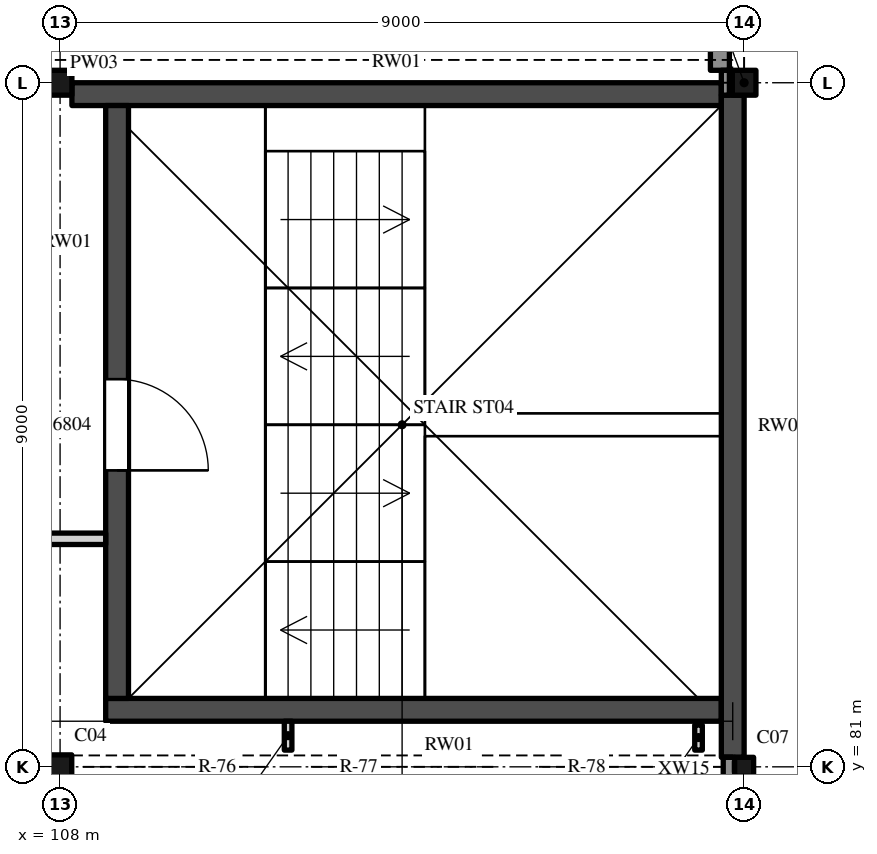
"""IFC4 building model, lengths in metres.
Left out: names, types, materials, properties, quantities, classifications, styles, units other than length and angle.
Written with IfcOpenShell. Run it as: python <this file> out.ifc"""

import sys

from ifc_helpers import new_model, si_unit, direction, frame, frame_2d, origin, origin_2d, place, context, subcontext, project, spatial, polyline, rectangle, hollow_rectangle, i_section, outline, extrude, element, fill, save


model = new_model("IFC4")
c1 = context("Model", 3, precision=1e-05, world=origin(), true_north=direction((0.0, 1.0)))
c2 = subcontext(c1, "Body", "Model", "MODEL_VIEW")
j1 = project(units=[si_unit("LENGTHUNIT", "METRE"), si_unit("PLANEANGLEUNIT", "RADIAN")], contexts=[c1])
p1 = place(None, origin())
s1 = spatial("IfcSite", under=j1, at=p1, CompositionType="ELEMENT")
p2 = place(p1, origin())
s2 = spatial("IfcBuilding", under=s1, at=p2, CompositionType="ELEMENT")
p3 = place(p2, frame((0.0, 0.0, 36.0)))
s3 = spatial("IfcBuildingStorey", under=s2, at=p3, CompositionType="ELEMENT", Elevation=36.0)
p4 = place(p3, frame((108.0, 81.0, 0.0), z_axis=(0.0, 0.0, 1.0), x_axis=(1.0, 0.0, 0.0)))
e1 = element("IfcColumn", 1, at=p4, inside=s3, PredefinedType="COLUMN", context=c2, shape_type="SweptSolid", body=[
    extrude(i_section(OverallWidth=0.307, OverallDepth=0.315, WebThickness=0.012, FlangeThickness=0.019, FilletRadius=0.017, at=origin_2d()), origin(), (0.0, 0.0, 1.0), 8.0),
])
p5 = place(p3, frame((117.0, 81.0, 0.0), z_axis=(0.0, 0.0, 1.0), x_axis=(1.0, 0.0, 0.0)))
e2 = element("IfcColumn", 2, at=p5, inside=s3, PredefinedType="COLUMN", context=c2, shape_type="SweptSolid", body=[
    extrude(hollow_rectangle(XDim=0.25, YDim=0.25, WallThickness=0.009, InnerFilletRadius=0.013, OuterFilletRadius=0.022, at=origin_2d()), origin(), (0.0, 0.0, 1.0), 8.0),
])
for number, where, z_axis, x_axis in (
    (3, (108.0, 90.0, 0.0), (0.0, 0.0, 1.0), (1.0, 0.0, 0.0)),
    (4, (117.0, 90.0, 0.0), (0.0, 0.0, 1.0), (1.0, 0.0, 0.0)),
):
    element("IfcColumn", number, at=place(p3, frame(where, z_axis=z_axis, x_axis=x_axis)), inside=s3, PredefinedType="COLUMN", context=c2, shape_type="SweptSolid", body=[
        extrude(i_section(OverallWidth=0.311, OverallDepth=0.327, WebThickness=0.016, FlangeThickness=0.025, FilletRadius=0.017, at=origin_2d()), origin(), (0.0, 0.0, 1.0), 7.785),
    ])
p6 = place(p3, frame((108.6, 81.75, 0.0), z_axis=(0.0, 0.0, 1.0), x_axis=(1.0, 0.0, 0.0)))
e5 = element("IfcWall", 5, at=p6, inside=s3, PredefinedType="SHEAR", context=c2, shape_type="SweptSolid", body=[
    extrude(rectangle(XDim=8.1, YDim=0.3, at=frame_2d((4.05, 0.0))), origin(), (0.0, 0.0, 1.0), 14.344),
])
p7 = place(p3, frame((108.156, 89.85, 0.0), z_axis=(0.0, 0.0, 1.0), x_axis=(1.0, 0.0, 0.0)))
e6 = element("IfcWall", 6, at=p7, inside=s3, PredefinedType="SHEAR", context=c2, shape_type="SweptSolid", body=[
    extrude(rectangle(XDim=8.544, YDim=0.3, at=frame_2d((4.272, 0.0))), origin(), (0.0, 0.0, 1.0), 7.864),
])
p8 = place(p3, frame((108.75, 81.9, 0.0), z_axis=(0.0, 0.0, 1.0), x_axis=(0.0, 1.0, 0.0)))
e7 = element("IfcWall", 7, at=p8, inside=s3, PredefinedType="SHEAR", context=c2, shape_type="SweptSolid", body=[
    extrude(outline(polyline([(0.0, 0.0), (7.8, 0.0), (7.8, 7.984), (0.0, 14.224), (0.0, 0.0)])), frame((0.0, 0.15, 0.0), z_axis=(0.0, -1.0, 0.0), x_axis=(1.0, 0.0, 0.0)), (0.0, 0.0, 1.0), 0.3),
])
p9 = place(p8, frame((3.0, 0.0, 0.0)))
e8 = element("IfcOpeningElement", 8, at=p9, cuts=e7, PredefinedType="OPENING", context=c2, shape_type="SweptSolid", body=[
    extrude(rectangle(XDim=1.2, YDim=2.1, at=frame_2d((0.6, 1.05))), frame((0.0, 0.16, 0.0), z_axis=(0.0, -1.0, 0.0), x_axis=(1.0, 0.0, 0.0)), (0.0, 0.0, 1.0), 0.32),
])
p10 = place(p3, frame((116.85, 81.125, 0.0), z_axis=(0.0, 0.0, 1.0), x_axis=(0.0, 1.0, 0.0)))
e9 = element("IfcWall", 9, at=p10, inside=s3, PredefinedType="SHEAR", context=c2, shape_type="SweptSolid", body=[
    extrude(outline(polyline([(0.0, 0.0), (8.711, 0.0), (8.711, 7.875), (0.0, 14.844), (0.0, 0.0)])), frame((0.0, 0.15, 0.0), z_axis=(0.0, -1.0, 0.0), x_axis=(1.0, 0.0, 0.0)), (0.0, 0.0, 1.0), 0.3),
])
p11 = place(p3, frame((116.681, 90.164, 0.0), z_axis=(0.0, 0.0, 1.0), x_axis=(0.0, 1.0, 0.0)))
e10 = element("IfcWall", 10, at=p11, inside=s3, PredefinedType="SOLIDWALL", context=c2, shape_type="SweptSolid", body=[
    extrude(rectangle(XDim=8.676, YDim=0.25, at=frame_2d((4.338, 0.0))), origin(), (0.0, 0.0, 1.0), 7.8),
])
p12 = place(p11, frame((0.586, 0.0, 1.6)))
e11 = element("IfcOpeningElement", 11, at=p12, cuts=e10, PredefinedType="OPENING", context=c2, shape_type="SweptSolid", body=[
    extrude(rectangle(XDim=1.6, YDim=1.2, at=frame_2d((0.8, 0.6))), frame((0.0, 0.135, 0.0), z_axis=(0.0, -1.0, 0.0), x_axis=(1.0, 0.0, 0.0)), (0.0, 0.0, 1.0), 0.27),
])
p13 = place(p11, frame((3.541, 0.0, 1.6)))
e12 = element("IfcOpeningElement", 12, at=p13, cuts=e10, PredefinedType="OPENING", context=c2, shape_type="SweptSolid", body=[
    extrude(rectangle(XDim=1.6, YDim=1.2, at=frame_2d((0.8, 0.6))), frame((0.0, 0.135, 0.0), z_axis=(0.0, -1.0, 0.0), x_axis=(1.0, 0.0, 0.0)), (0.0, 0.0, 1.0), 0.27),
])
p14 = place(p11, frame((6.486, 0.0, 1.6)))
e13 = element("IfcOpeningElement", 13, at=p14, cuts=e10, PredefinedType="OPENING", context=c2, shape_type="SweptSolid", body=[
    extrude(rectangle(XDim=1.6, YDim=1.2, at=frame_2d((0.8, 0.6))), frame((0.0, 0.135, 0.0), z_axis=(0.0, -1.0, 0.0), x_axis=(1.0, 0.0, 0.0)), (0.0, 0.0, 1.0), 0.27),
])
p15 = place(p3, frame((116.8, 80.803, 0.0), z_axis=(0.0, 0.0, 1.0), x_axis=(0.0, 1.0, 0.0)))
e14 = element("IfcWall", 14, at=p15, inside=s3, PredefinedType="SOLIDWALL", context=c2, shape_type="SweptSolid", body=[
    extrude(rectangle(XDim=0.322, YDim=0.15, at=frame_2d((0.161, 0.0))), origin(), (0.0, 0.0, 1.0), 14.844),
])
p16 = place(p3, frame((116.753, 89.836, 0.0), z_axis=(0.0, 0.0, 1.0), x_axis=(0.0, 1.0, 0.0)))
e15 = element("IfcWall", 15, at=p16, inside=s3, PredefinedType="SOLIDWALL", context=c2, shape_type="SweptSolid", body=[
    extrude(rectangle(XDim=0.327, YDim=0.106, at=frame_2d((0.164, 0.0))), origin(), (0.0, 0.0, 1.0), 14.844),
])
p17 = place(p3, frame((54.15, 81.0, 15.2), z_axis=(0.0, 0.0, 1.0), x_axis=(1.0, 0.0, 0.0)))
e16 = element("IfcWall", 16, at=p17, inside=s3, PredefinedType="SOLIDWALL", context=c2, shape_type="SweptSolid", body=[
    extrude(rectangle(XDim=62.7, YDim=0.3, at=frame_2d((31.35, 0.0))), origin(), (0.0, 0.0, 1.0), 0.9),
])
p18 = place(p17, frame((0.15, 0.0, 0.15)))
e17 = element("IfcOpeningElement", 17, at=p18, cuts=e16, PredefinedType="OPENING", context=c2, shape_type="SweptSolid", body=[
    extrude(rectangle(XDim=2.4, YDim=0.6, at=frame_2d((1.2, 0.3))), frame((0.0, 0.16, 0.0), z_axis=(0.0, -1.0, 0.0), x_axis=(1.0, 0.0, 0.0)), (0.0, 0.0, 1.0), 0.32),
])
p19 = place(p17, frame((3.15, 0.0, 0.15)))
e18 = element("IfcOpeningElement", 18, at=p19, cuts=e16, PredefinedType="OPENING", context=c2, shape_type="SweptSolid", body=[
    extrude(rectangle(XDim=2.4, YDim=0.6, at=frame_2d((1.2, 0.3))), frame((0.0, 0.16, 0.0), z_axis=(0.0, -1.0, 0.0), x_axis=(1.0, 0.0, 0.0)), (0.0, 0.0, 1.0), 0.32),
])
p20 = place(p17, frame((6.15, 0.0, 0.15)))
e19 = element("IfcOpeningElement", 19, at=p20, cuts=e16, PredefinedType="OPENING", context=c2, shape_type="SweptSolid", body=[
    extrude(rectangle(XDim=2.4, YDim=0.6, at=frame_2d((1.2, 0.3))), frame((0.0, 0.16, 0.0), z_axis=(0.0, -1.0, 0.0), x_axis=(1.0, 0.0, 0.0)), (0.0, 0.0, 1.0), 0.32),
])
p21 = place(p17, frame((9.15, 0.0, 0.15)))
e20 = element("IfcOpeningElement", 20, at=p21, cuts=e16, PredefinedType="OPENING", context=c2, shape_type="SweptSolid", body=[
    extrude(rectangle(XDim=2.4, YDim=0.6, at=frame_2d((1.2, 0.3))), frame((0.0, 0.16, 0.0), z_axis=(0.0, -1.0, 0.0), x_axis=(1.0, 0.0, 0.0)), (0.0, 0.0, 1.0), 0.32),
])
p22 = place(p17, frame((12.15, 0.0, 0.15)))
e21 = element("IfcOpeningElement", 21, at=p22, cuts=e16, PredefinedType="OPENING", context=c2, shape_type="SweptSolid", body=[
    extrude(rectangle(XDim=2.4, YDim=0.6, at=frame_2d((1.2, 0.3))), frame((0.0, 0.16, 0.0), z_axis=(0.0, -1.0, 0.0), x_axis=(1.0, 0.0, 0.0)), (0.0, 0.0, 1.0), 0.32),
])
p23 = place(p17, frame((15.15, 0.0, 0.15)))
e22 = element("IfcOpeningElement", 22, at=p23, cuts=e16, PredefinedType="OPENING", context=c2, shape_type="SweptSolid", body=[
    extrude(rectangle(XDim=2.4, YDim=0.6, at=frame_2d((1.2, 0.3))), frame((0.0, 0.16, 0.0), z_axis=(0.0, -1.0, 0.0), x_axis=(1.0, 0.0, 0.0)), (0.0, 0.0, 1.0), 0.32),
])
p24 = place(p17, frame((18.15, 0.0, 0.15)))
e23 = element("IfcOpeningElement", 23, at=p24, cuts=e16, PredefinedType="OPENING", context=c2, shape_type="SweptSolid", body=[
    extrude(rectangle(XDim=2.4, YDim=0.6, at=frame_2d((1.2, 0.3))), frame((0.0, 0.16, 0.0), z_axis=(0.0, -1.0, 0.0), x_axis=(1.0, 0.0, 0.0)), (0.0, 0.0, 1.0), 0.32),
])
p25 = place(p17, frame((21.15, 0.0, 0.15)))
e24 = element("IfcOpeningElement", 24, at=p25, cuts=e16, PredefinedType="OPENING", context=c2, shape_type="SweptSolid", body=[
    extrude(rectangle(XDim=2.4, YDim=0.6, at=frame_2d((1.2, 0.3))), frame((0.0, 0.16, 0.0), z_axis=(0.0, -1.0, 0.0), x_axis=(1.0, 0.0, 0.0)), (0.0, 0.0, 1.0), 0.32),
])
p26 = place(p17, frame((24.15, 0.0, 0.15)))
e25 = element("IfcOpeningElement", 25, at=p26, cuts=e16, PredefinedType="OPENING", context=c2, shape_type="SweptSolid", body=[
    extrude(rectangle(XDim=2.4, YDim=0.6, at=frame_2d((1.2, 0.3))), frame((0.0, 0.16, 0.0), z_axis=(0.0, -1.0, 0.0), x_axis=(1.0, 0.0, 0.0)), (0.0, 0.0, 1.0), 0.32),
])
p27 = place(p17, frame((27.15, 0.0, 0.15)))
e26 = element("IfcOpeningElement", 26, at=p27, cuts=e16, PredefinedType="OPENING", context=c2, shape_type="SweptSolid", body=[
    extrude(rectangle(XDim=2.4, YDim=0.6, at=frame_2d((1.2, 0.3))), frame((0.0, 0.16, 0.0), z_axis=(0.0, -1.0, 0.0), x_axis=(1.0, 0.0, 0.0)), (0.0, 0.0, 1.0), 0.32),
])
p28 = place(p17, frame((30.15, 0.0, 0.15)))
e27 = element("IfcOpeningElement", 27, at=p28, cuts=e16, PredefinedType="OPENING", context=c2, shape_type="SweptSolid", body=[
    extrude(rectangle(XDim=2.4, YDim=0.6, at=frame_2d((1.2, 0.3))), frame((0.0, 0.16, 0.0), z_axis=(0.0, -1.0, 0.0), x_axis=(1.0, 0.0, 0.0)), (0.0, 0.0, 1.0), 0.32),
])
p29 = place(p17, frame((33.15, 0.0, 0.15)))
e28 = element("IfcOpeningElement", 28, at=p29, cuts=e16, PredefinedType="OPENING", context=c2, shape_type="SweptSolid", body=[
    extrude(rectangle(XDim=2.4, YDim=0.6, at=frame_2d((1.2, 0.3))), frame((0.0, 0.16, 0.0), z_axis=(0.0, -1.0, 0.0), x_axis=(1.0, 0.0, 0.0)), (0.0, 0.0, 1.0), 0.32),
])
p30 = place(p17, frame((36.15, 0.0, 0.15)))
e29 = element("IfcOpeningElement", 29, at=p30, cuts=e16, PredefinedType="OPENING", context=c2, shape_type="SweptSolid", body=[
    extrude(rectangle(XDim=2.4, YDim=0.6, at=frame_2d((1.2, 0.3))), frame((0.0, 0.16, 0.0), z_axis=(0.0, -1.0, 0.0), x_axis=(1.0, 0.0, 0.0)), (0.0, 0.0, 1.0), 0.32),
])
p31 = place(p17, frame((39.15, 0.0, 0.15)))
e30 = element("IfcOpeningElement", 30, at=p31, cuts=e16, PredefinedType="OPENING", context=c2, shape_type="SweptSolid", body=[
    extrude(rectangle(XDim=2.4, YDim=0.6, at=frame_2d((1.2, 0.3))), frame((0.0, 0.16, 0.0), z_axis=(0.0, -1.0, 0.0), x_axis=(1.0, 0.0, 0.0)), (0.0, 0.0, 1.0), 0.32),
])
p32 = place(p17, frame((42.15, 0.0, 0.15)))
e31 = element("IfcOpeningElement", 31, at=p32, cuts=e16, PredefinedType="OPENING", context=c2, shape_type="SweptSolid", body=[
    extrude(rectangle(XDim=2.4, YDim=0.6, at=frame_2d((1.2, 0.3))), frame((0.0, 0.16, 0.0), z_axis=(0.0, -1.0, 0.0), x_axis=(1.0, 0.0, 0.0)), (0.0, 0.0, 1.0), 0.32),
])
p33 = place(p17, frame((45.15, 0.0, 0.15)))
e32 = element("IfcOpeningElement", 32, at=p33, cuts=e16, PredefinedType="OPENING", context=c2, shape_type="SweptSolid", body=[
    extrude(rectangle(XDim=2.4, YDim=0.6, at=frame_2d((1.2, 0.3))), frame((0.0, 0.16, 0.0), z_axis=(0.0, -1.0, 0.0), x_axis=(1.0, 0.0, 0.0)), (0.0, 0.0, 1.0), 0.32),
])
p34 = place(p17, frame((48.15, 0.0, 0.15)))
e33 = element("IfcOpeningElement", 33, at=p34, cuts=e16, PredefinedType="OPENING", context=c2, shape_type="SweptSolid", body=[
    extrude(rectangle(XDim=2.4, YDim=0.6, at=frame_2d((1.2, 0.3))), frame((0.0, 0.16, 0.0), z_axis=(0.0, -1.0, 0.0), x_axis=(1.0, 0.0, 0.0)), (0.0, 0.0, 1.0), 0.32),
])
p35 = place(p17, frame((51.15, 0.0, 0.15)))
e34 = element("IfcOpeningElement", 34, at=p35, cuts=e16, PredefinedType="OPENING", context=c2, shape_type="SweptSolid", body=[
    extrude(rectangle(XDim=2.4, YDim=0.6, at=frame_2d((1.2, 0.3))), frame((0.0, 0.16, 0.0), z_axis=(0.0, -1.0, 0.0), x_axis=(1.0, 0.0, 0.0)), (0.0, 0.0, 1.0), 0.32),
])
p36 = place(p17, frame((54.15, 0.0, 0.15)))
e35 = element("IfcOpeningElement", 35, at=p36, cuts=e16, PredefinedType="OPENING", context=c2, shape_type="SweptSolid", body=[
    extrude(rectangle(XDim=2.4, YDim=0.6, at=frame_2d((1.2, 0.3))), frame((0.0, 0.16, 0.0), z_axis=(0.0, -1.0, 0.0), x_axis=(1.0, 0.0, 0.0)), (0.0, 0.0, 1.0), 0.32),
])
p37 = place(p17, frame((57.15, 0.0, 0.15)))
e36 = element("IfcOpeningElement", 36, at=p37, cuts=e16, PredefinedType="OPENING", context=c2, shape_type="SweptSolid", body=[
    extrude(rectangle(XDim=2.4, YDim=0.6, at=frame_2d((1.2, 0.3))), frame((0.0, 0.16, 0.0), z_axis=(0.0, -1.0, 0.0), x_axis=(1.0, 0.0, 0.0)), (0.0, 0.0, 1.0), 0.32),
])
p38 = place(p17, frame((60.15, 0.0, 0.15)))
e37 = element("IfcOpeningElement", 37, at=p38, cuts=e16, PredefinedType="OPENING", context=c2, shape_type="SweptSolid", body=[
    extrude(rectangle(XDim=2.4, YDim=0.6, at=frame_2d((1.2, 0.3))), frame((0.0, 0.16, 0.0), z_axis=(0.0, -1.0, 0.0), x_axis=(1.0, 0.0, 0.0)), (0.0, 0.0, 1.0), 0.32),
])
p39 = place(p3, frame((54.156, 90.15, 7.8), z_axis=(0.0, 0.0, 1.0), x_axis=(1.0, 0.0, 0.0)))
e38 = element("IfcWall", 38, at=p39, inside=s3, PredefinedType="SOLIDWALL", context=c2, shape_type="SweptSolid", body=[
    extrude(outline(polyline([(0.0, 0.0), (62.689, 0.0), (62.689, 0.071), (61.785, 0.883), (60.725, 1.494), (59.561, 1.871), (58.344, 1.999), (57.128, 1.871), (55.964, 1.494), (54.904, 0.883), (53.844, 0.05), (52.785, 0.883), (51.725, 1.494), (50.561, 1.871), (49.344, 1.999), (48.128, 1.871), (46.964, 1.494), (45.904, 0.883), (44.844, 0.05), (43.785, 0.883), (42.725, 1.494), (41.561, 1.871), (40.344, 1.999), (39.128, 1.871), (37.964, 1.494), (36.904, 0.883), (35.844, 0.05), (34.785, 0.883), (33.725, 1.494), (32.561, 1.871), (31.344, 1.999), (30.128, 1.871), (28.964, 1.494), (27.904, 0.883), (26.844, 0.05), (25.785, 0.883), (24.725, 1.494), (23.561, 1.871), (22.344, 1.999), (21.128, 1.871), (19.964, 1.494), (18.904, 0.883), (17.844, 0.05), (16.785, 0.883), (15.725, 1.494), (14.561, 1.871), (13.344, 1.999), (12.128, 1.871), (10.964, 1.494), (9.904, 0.883), (8.844, 0.05), (7.785, 0.883), (6.725, 1.494), (5.561, 1.871), (4.344, 1.999), (3.128, 1.871), (1.964, 1.494), (0.904, 0.883), (0.0, 0.071), (0.0, 0.0)])), frame((0.0, 0.15, 0.0), z_axis=(0.0, -1.0, 0.0), x_axis=(1.0, 0.0, 0.0)), (0.0, 0.0, 1.0), 0.3),
])
p40 = place(p3, frame((104.725, 84.0, 0.0), z_axis=(0.0, 0.0, 1.0), x_axis=(1.0, 0.0, 0.0)))
e39 = element("IfcWall", 39, at=p40, inside=s3, PredefinedType="PARTITIONING", context=c2, shape_type="SweptSolid", body=[
    extrude(rectangle(XDim=3.875, YDim=0.15, at=frame_2d((1.938, 0.0))), origin(), (0.0, 0.0, 1.0), 7.744),
])
p41 = place(p3, frame((111.0, 81.22, 0.0), z_axis=(0.0, 0.0, 1.0), x_axis=(0.0, 1.0, 0.0)))
e40 = element("IfcWall", 40, at=p41, inside=s3, PredefinedType="PARTITIONING", context=c2, shape_type="SweptSolid", body=[
    extrude(rectangle(XDim=0.38, YDim=0.1, at=frame_2d((0.19, 0.0))), origin(), (0.0, 0.0, 1.0), 7.744),
])
p42 = place(p3, frame((116.4, 81.22, 0.0), z_axis=(0.0, 0.0, 1.0), x_axis=(0.0, 1.0, 0.0)))
e41 = element("IfcWall", 41, at=p42, inside=s3, PredefinedType="PARTITIONING", context=c2, shape_type="SweptSolid", body=[
    extrude(rectangle(XDim=0.33, YDim=0.1, at=frame_2d((0.165, 0.0))), origin(), (0.0, 0.0, 1.0), 7.744),
])
p43 = place(p9, origin())
e42 = element("IfcDoor", 42, at=p43, inside=s3, OperationType="SINGLE_SWING_LEFT", PredefinedType="DOOR", context=c2, shape_type="SweptSolid", body=[
    extrude(rectangle(XDim=1.2, YDim=2.1, at=frame_2d((0.6, 1.05))), frame((0.0, 0.025, 0.0), z_axis=(0.0, -1.0, 0.0), x_axis=(1.0, 0.0, 0.0)), (0.0, 0.0, 1.0), 0.05),
])
fill(e8, e42)
p44 = place(p36, origin())
e43 = element("IfcWindow", 43, at=p44, inside=s3, PartitioningType="SINGLE_PANEL", PredefinedType="SKYLIGHT", context=c2, shape_type="SweptSolid", body=[
    extrude(rectangle(XDim=2.4, YDim=0.6, at=frame_2d((1.2, 0.3))), frame((0.0, 0.03, 0.0), z_axis=(0.0, -1.0, 0.0), x_axis=(1.0, 0.0, 0.0)), (0.0, 0.0, 1.0), 0.06),
])
fill(e35, e43)
p45 = place(p37, origin())
e44 = element("IfcWindow", 44, at=p45, inside=s3, PartitioningType="SINGLE_PANEL", PredefinedType="SKYLIGHT", context=c2, shape_type="SweptSolid", body=[
    extrude(rectangle(XDim=2.4, YDim=0.6, at=frame_2d((1.2, 0.3))), frame((0.0, 0.03, 0.0), z_axis=(0.0, -1.0, 0.0), x_axis=(1.0, 0.0, 0.0)), (0.0, 0.0, 1.0), 0.06),
])
fill(e36, e44)
p46 = place(p38, origin())
e45 = element("IfcWindow", 45, at=p46, inside=s3, PartitioningType="SINGLE_PANEL", PredefinedType="SKYLIGHT", context=c2, shape_type="SweptSolid", body=[
    extrude(rectangle(XDim=2.4, YDim=0.6, at=frame_2d((1.2, 0.3))), frame((0.0, 0.03, 0.0), z_axis=(0.0, -1.0, 0.0), x_axis=(1.0, 0.0, 0.0)), (0.0, 0.0, 1.0), 0.06),
])
fill(e37, e45)
save(model, sys.argv[1])
